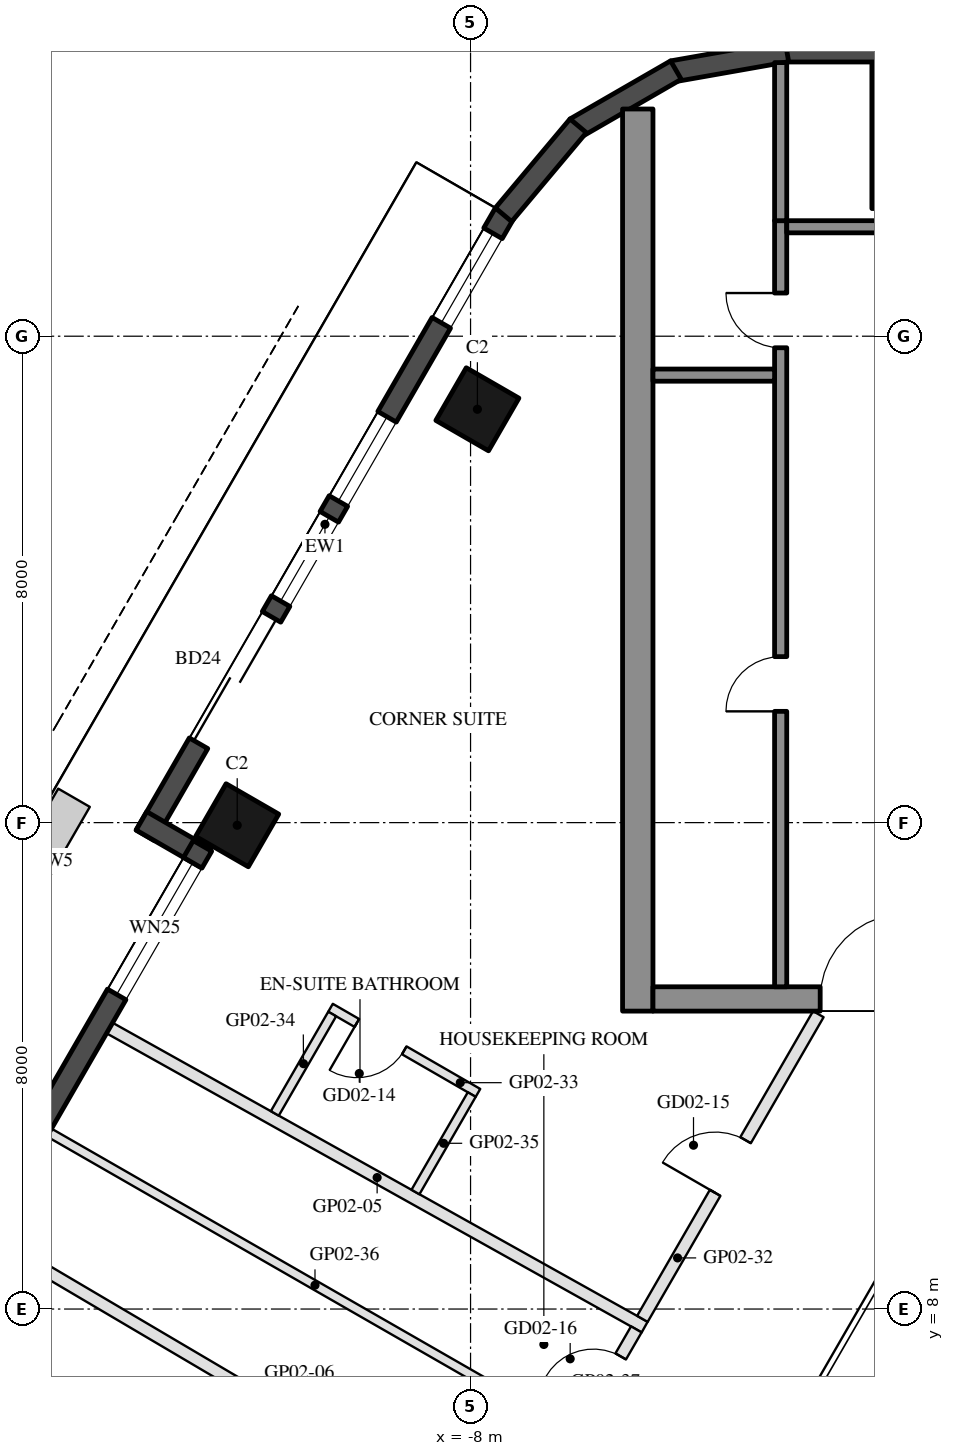
"""IFC4 building model, lengths in metres.
Left out: names, types, materials, properties, quantities, classifications, styles, units other than length and angle.
Written with IfcOpenShell. Run it as: python <this file> out.ifc"""

import sys

from ifc_helpers import new_model, si_unit, direction, frame, frame_2d, origin, origin_2d, place, context, subcontext, project, spatial, rectangle, hollow_rectangle, extrude, element, fill, save


model = new_model("IFC4")
c1 = context("Model", 3, precision=1e-05, world=origin(), true_north=direction((0.0, 1.0)))
c2 = subcontext(c1, "Body", "Model", "MODEL_VIEW")
j1 = project(units=[si_unit("LENGTHUNIT", "METRE"), si_unit("PLANEANGLEUNIT", "RADIAN")], contexts=[c1])
p1 = place(None, origin())
s1 = spatial("IfcSite", under=j1, at=p1, CompositionType="ELEMENT")
p2 = place(p1, origin())
s2 = spatial("IfcBuilding", under=s1, at=p2, CompositionType="ELEMENT")
p3 = place(p2, frame((0.0, 0.0, 57.6)))
s3 = spatial("IfcBuildingStorey", under=s2, at=p3, CompositionType="ELEMENT", Elevation=57.6)
for number, where, z_axis, x_axis in (
    (1, (-7.888, 22.798, 0.0), (0.0, 0.0, 1.0), (0.5, 0.866, 0.0)),
    (2, (-11.838, 15.957, 0.0), (0.0, 0.0, 1.0), (0.5, 0.866, 0.0)),
):
    element("IfcColumn", number, at=place(p3, frame(where, z_axis=z_axis, x_axis=x_axis)), inside=s3, PredefinedType="COLUMN", context=c2, shape_type="SweptSolid", body=[
        extrude(hollow_rectangle(XDim=1.0, YDim=1.0, WallThickness=0.045, at=origin_2d()), origin(), (0.0, 0.0, 1.0), 3.7),
    ])
p4 = place(p3, frame((0.0, 27.3, 0.0), z_axis=(0.0, 0.0, 1.0), x_axis=(1.0, 0.0, 0.0)))
e3 = element("IfcColumn", 3, at=p4, inside=s3, PredefinedType="COLUMN", context=c2, shape_type="SweptSolid", body=[
    extrude(hollow_rectangle(XDim=2.8, YDim=2.4, WallThickness=0.07, at=origin_2d()), origin(), (0.0, 0.0, 1.0), 3.7),
])
p5 = place(p3, frame((-7.441, 26.022, 0.0), z_axis=(0.0, 0.0, 1.0), x_axis=(-0.499992533062, -0.86602971478, 0.0)))
e4 = element("IfcWall", 4, at=p5, inside=s3, PredefinedType="SOLIDWALL", context=c2, shape_type="SweptSolid", body=[
    extrude(rectangle(XDim=11.816, YDim=0.35, at=frame_2d((5.908, 0.0))), origin(), (0.0, 0.0, 1.0), 3.55),
])
p6 = place(p5, frame((0.381, 0.0, 0.3)))
e5 = element("IfcOpeningElement", 5, at=p6, cuts=e4, PredefinedType="OPENING", context=c2, shape_type="SweptSolid", body=[
    extrude(rectangle(XDim=1.7, YDim=2.65, at=frame_2d((0.85, 1.325))), frame((0.0, 0.185, 0.0), z_axis=(0.0, -1.0, 0.0), x_axis=(1.0, 0.0, 0.0)), (0.0, 0.0, 1.0), 0.37),
])
p7 = place(p5, frame((7.666, 0.0, 0.0)))
e6 = element("IfcOpeningElement", 6, at=p7, cuts=e4, PredefinedType="OPENING", context=c2, shape_type="SweptSolid", body=[
    extrude(rectangle(XDim=2.4, YDim=2.4, at=frame_2d((1.2, 1.2))), frame((0.0, 0.185, 0.0), z_axis=(0.0, -1.0, 0.0), x_axis=(1.0, 0.0, 0.0)), (0.0, 0.0, 1.0), 0.37),
])
p8 = place(p5, frame((3.865, 0.0, 0.3)))
e7 = element("IfcOpeningElement", 7, at=p8, cuts=e4, PredefinedType="OPENING", context=c2, shape_type="SweptSolid", body=[
    extrude(rectangle(XDim=1.6, YDim=2.65, at=frame_2d((0.8, 1.325))), frame((0.0, 0.185, 0.0), z_axis=(0.0, -1.0, 0.0), x_axis=(1.0, 0.0, 0.0)), (0.0, 0.0, 1.0), 0.37),
])
p9 = place(p5, frame((5.765, 0.0, 0.3)))
e8 = element("IfcOpeningElement", 8, at=p9, cuts=e4, PredefinedType="OPENING", context=c2, shape_type="SweptSolid", body=[
    extrude(rectangle(XDim=1.6, YDim=2.65, at=frame_2d((0.8, 1.325))), frame((0.0, 0.185, 0.0), z_axis=(0.0, -1.0, 0.0), x_axis=(1.0, 0.0, 0.0)), (0.0, 0.0, 1.0), 0.37),
])
p10 = place(p3, frame((-13.413, 16.029, 0.0), z_axis=(0.0, 0.0, 1.0), x_axis=(0.866005645448, -0.500034220881, 0.0)))
e9 = element("IfcWall", 9, at=p10, inside=s3, PredefinedType="SOLIDWALL", context=c2, shape_type="SweptSolid", body=[
    extrude(rectangle(XDim=1.22, YDim=0.35, at=frame_2d((0.61, 0.0))), origin(), (0.0, 0.0, 1.0), 3.55),
])
p11 = place(p3, frame((-12.409, 15.617, 0.0), z_axis=(0.0, 0.0, 1.0), x_axis=(-0.500003597184, -0.866023326939, 0.0)))
e10 = element("IfcWall", 10, at=p11, inside=s3, PredefinedType="SOLIDWALL", context=c2, shape_type="SweptSolid", body=[
    extrude(rectangle(XDim=6.74, YDim=0.35, at=frame_2d((3.37, 0.0))), origin(), (0.0, 0.0, 1.0), 3.55),
])
p12 = place(p11, frame((0.32, 0.0, 0.3)))
e11 = element("IfcOpeningElement", 11, at=p12, cuts=e10, PredefinedType="OPENING", context=c2, shape_type="SweptSolid", body=[
    extrude(rectangle(XDim=2.5, YDim=2.65, at=frame_2d((1.25, 1.325))), frame((0.0, 0.185, 0.0), z_axis=(0.0, -1.0, 0.0), x_axis=(1.0, 0.0, 0.0)), (0.0, 0.0, 1.0), 0.37),
])
p13 = place(p3, frame((2.829, 28.685, 0.0), z_axis=(0.0, 0.0, 1.0), x_axis=(-1.0, 0.0, 0.0)))
e12 = element("IfcWall", 12, at=p13, inside=s3, PredefinedType="SOLIDWALL", context=c2, shape_type="SweptSolid", body=[
    extrude(rectangle(XDim=5.658, YDim=0.35, at=frame_2d((2.829, 0.0))), origin(), (0.0, 0.0, 1.0), 3.55),
])
for number, where, z_axis, x_axis in (
    (13, (-2.799, 28.688, 0.0), (0.0, 0.0, 1.0), (-0.985, -0.174, 0.0)),
    (14, (-4.623, 28.377, 0.0), (0.0, 0.0, 1.0), (-0.866, -0.5, 0.0)),
):
    element("IfcWall", number, at=place(p3, frame(where, z_axis=z_axis, x_axis=x_axis)), inside=s3, PredefinedType="SOLIDWALL", context=c2, shape_type="SweptSolid", body=[
        extrude(rectangle(XDim=1.91, YDim=0.35, at=frame_2d((0.955, 0.0))), origin(), (0.0, 0.0, 1.0), 3.55),
    ])
p14 = place(p3, frame((-6.23, 27.461, 0.0), z_axis=(0.0, 0.0, 1.0), x_axis=(-0.642808304945, -0.766027077259, 0.0)))
e15 = element("IfcWall", 15, at=p14, inside=s3, PredefinedType="SOLIDWALL", context=c2, shape_type="SweptSolid", body=[
    extrude(rectangle(XDim=1.91, YDim=0.35, at=frame_2d((0.955, 0.0))), origin(), (0.0, 0.0, 1.0), 3.55),
])
p15 = place(p3, frame((-5.25, 12.9, 0.0), z_axis=(0.0, 0.0, 1.0), x_axis=(0.0, 1.0, 0.0)))
e16 = element("IfcWall", 16, at=p15, inside=s3, PredefinedType="SHEAR", context=c2, shape_type="SweptSolid", body=[
    extrude(rectangle(XDim=14.837, YDim=0.5, at=frame_2d((7.418, 0.0))), origin(), (0.0, 0.0, 1.0), 3.5),
])
p16 = place(p3, frame((5.0, 13.1, 0.0), z_axis=(0.0, 0.0, 1.0), x_axis=(-1.0, 0.0, 0.0)))
e17 = element("IfcWall", 17, at=p16, inside=s3, PredefinedType="SHEAR", context=c2, shape_type="SweptSolid", body=[
    extrude(rectangle(XDim=10.0, YDim=0.4, at=frame_2d((5.0, 0.0))), origin(), (0.0, 0.0, 1.0), 3.5),
])
p17 = place(p16, frame((3.55, 0.0, 0.0)))
e18 = element("IfcOpeningElement", 18, at=p17, cuts=e17, PredefinedType="OPENING", context=c2, shape_type="SweptSolid", body=[
    extrude(rectangle(XDim=1.1, YDim=2.1, at=frame_2d((0.55, 1.05))), frame((0.0, 0.21, 0.0), z_axis=(0.0, -1.0, 0.0), x_axis=(1.0, 0.0, 0.0)), (0.0, 0.0, 1.0), 0.42),
])
p18 = place(p16, frame((5.85, 0.0, 0.0)))
e19 = element("IfcOpeningElement", 19, at=p18, cuts=e17, PredefinedType="OPENING", context=c2, shape_type="SweptSolid", body=[
    extrude(rectangle(XDim=1.4, YDim=2.1, at=frame_2d((0.7, 1.05))), frame((0.0, 0.21, 0.0), z_axis=(0.0, -1.0, 0.0), x_axis=(1.0, 0.0, 0.0)), (0.0, 0.0, 1.0), 0.42),
])
p19 = place(p3, frame((-2.9, 13.3, 0.0), z_axis=(0.0, 0.0, 1.0), x_axis=(0.0, 1.0, 0.0)))
e20 = element("IfcWall", 20, at=p19, inside=s3, PredefinedType="SHEAR", context=c2, shape_type="SweptSolid", body=[
    extrude(rectangle(XDim=12.6, YDim=0.2, at=frame_2d((6.3, 0.0))), origin(), (0.0, 0.0, 1.0), 3.5),
])
p20 = place(p19, frame((4.53, 0.0, 0.0)))
e21 = element("IfcOpeningElement", 21, at=p20, cuts=e20, PredefinedType="OPENING", context=c2, shape_type="SweptSolid", body=[
    extrude(rectangle(XDim=0.9, YDim=2.1, at=frame_2d((0.45, 1.05))), frame((0.0, 0.11, 0.0), z_axis=(0.0, -1.0, 0.0), x_axis=(1.0, 0.0, 0.0)), (0.0, 0.0, 1.0), 0.22),
])
p21 = place(p19, frame((10.51, 0.0, 0.0)))
e22 = element("IfcOpeningElement", 22, at=p21, cuts=e20, PredefinedType="OPENING", context=c2, shape_type="SweptSolid", body=[
    extrude(rectangle(XDim=0.9, YDim=2.1, at=frame_2d((0.45, 1.05))), frame((0.0, 0.11, 0.0), z_axis=(0.0, -1.0, 0.0), x_axis=(1.0, 0.0, 0.0)), (0.0, 0.0, 1.0), 0.22),
])
p22 = place(p3, frame((-0.4, 25.8, 0.0), z_axis=(0.0, 0.0, 1.0), x_axis=(-1.0, 0.0, 0.0)))
e23 = element("IfcWall", 23, at=p22, inside=s3, PredefinedType="SHEAR", context=c2, shape_type="SweptSolid", body=[
    extrude(rectangle(XDim=2.4, YDim=0.2, at=frame_2d((1.2, 0.0))), origin(), (0.0, 0.0, 1.0), 3.5),
])
p23 = place(p3, frame((-3.0, 23.36, 0.0), z_axis=(0.0, 0.0, 1.0), x_axis=(-1.0, 0.0, 0.0)))
e24 = element("IfcWall", 24, at=p23, inside=s3, PredefinedType="SHEAR", context=c2, shape_type="SweptSolid", body=[
    extrude(rectangle(XDim=2.0, YDim=0.2, at=frame_2d((1.0, 0.0))), origin(), (0.0, 0.0, 1.0), 3.5),
])
p24 = place(p3, frame((-2.9, 25.9, 0.0), z_axis=(0.0, 0.0, 1.0), x_axis=(0.0, 1.0, 0.0)))
e25 = element("IfcWall", 25, at=p24, inside=s3, PredefinedType="SHEAR", context=c2, shape_type="SweptSolid", body=[
    extrude(rectangle(XDim=2.6, YDim=0.2, at=frame_2d((1.3, 0.0))), origin(), (0.0, 0.0, 1.0), 3.5),
])
p25 = place(p3, frame((-13.936, 12.622, 0.0), z_axis=(0.0, 0.0, 1.0), x_axis=(0.872898889426, -0.487901146585, 0.0)))
e26 = element("IfcWall", 26, at=p25, inside=s3, PredefinedType="PARTITIONING", context=c2, shape_type="SweptSolid", body=[
    extrude(rectangle(XDim=10.081, YDim=0.2, at=frame_2d((5.041, 0.0))), origin(), (0.0, 0.0, 1.0), 2.95),
])
p26 = place(p3, frame((-15.362, 8.853, 0.0), z_axis=(0.0, 0.0, 1.0), x_axis=(0.861347313363, -0.508016540835, 0.0)))
e27 = element("IfcWall", 27, at=p26, inside=s3, PredefinedType="PARTITIONING", context=c2, shape_type="SweptSolid", body=[
    extrude(rectangle(XDim=9.43, YDim=0.2, at=frame_2d((4.715, 0.0))), origin(), (0.0, 0.0, 1.0), 2.95),
])
p27 = place(p3, frame((-5.174, 7.838, 0.0), z_axis=(0.0, 0.0, 1.0), x_axis=(0.499973220989, 0.866040864101, 0.0)))
e28 = element("IfcWall", 28, at=p27, inside=s3, PredefinedType="PARTITIONING", context=c2, shape_type="SweptSolid", body=[
    extrude(rectangle(XDim=5.787, YDim=0.2, at=frame_2d((2.894, 0.0))), origin(), (0.0, 0.0, 1.0), 2.95),
])
p28 = place(p27, frame((2.393, 0.0, 0.0)))
e29 = element("IfcOpeningElement", 29, at=p28, cuts=e28, PredefinedType="OPENING", context=c2, shape_type="SweptSolid", body=[
    extrude(rectangle(XDim=1.0, YDim=2.1, at=frame_2d((0.5, 1.05))), frame((0.0, 0.11, 0.0), z_axis=(0.0, -1.0, 0.0), x_axis=(1.0, 0.0, 0.0)), (0.0, 0.0, 1.0), 0.22),
])
p29 = place(p3, frame((-7.878, 11.555, 0.0), z_axis=(0.0, 0.0, 1.0), x_axis=(-0.865996816683, 0.500049511043, 0.0)))
e30 = element("IfcWall", 30, at=p29, inside=s3, PredefinedType="PARTITIONING", context=c2, shape_type="SweptSolid", body=[
    extrude(rectangle(XDim=2.8, YDim=0.15, at=frame_2d((1.4, 0.0))), origin(), (0.0, 0.0, 1.0), 3.55),
])
p30 = place(p29, frame((1.4, 0.0, 0.0)))
e31 = element("IfcOpeningElement", 31, at=p30, cuts=e30, PredefinedType="OPENING", context=c2, shape_type="SweptSolid", body=[
    extrude(rectangle(XDim=0.9, YDim=2.1, at=frame_2d((0.45, 1.05))), frame((0.0, 0.085, 0.0), z_axis=(0.0, -1.0, 0.0), x_axis=(1.0, 0.0, 0.0)), (0.0, 0.0, 1.0), 0.17),
])
p31 = place(p3, frame((-10.275, 12.853, 0.0), z_axis=(0.0, 0.0, 1.0), x_axis=(-0.499950073403, -0.866054227, 0.0)))
e32 = element("IfcWall", 32, at=p31, inside=s3, PredefinedType="PARTITIONING", context=c2, shape_type="SweptSolid", body=[
    extrude(rectangle(XDim=1.888, YDim=0.15, at=frame_2d((0.944, 0.0))), origin(), (0.0, 0.0, 1.0), 3.55),
])
p32 = place(p3, frame((-7.98, 11.528, 0.0), z_axis=(0.0, 0.0, 1.0), x_axis=(-0.500011685716, -0.866018656928, 0.0)))
e33 = element("IfcWall", 33, at=p32, inside=s3, PredefinedType="PARTITIONING", context=c2, shape_type="SweptSolid", body=[
    extrude(rectangle(XDim=1.851, YDim=0.15, at=frame_2d((0.926, 0.0))), origin(), (0.0, 0.0, 1.0), 3.55),
])
p33 = place(p3, frame((-14.929, 10.902, 0.0), z_axis=(0.0, 0.0, 1.0), x_axis=(0.867191892367, -0.497974117614, 0.0)))
e34 = element("IfcWall", 34, at=p33, inside=s3, PredefinedType="PARTITIONING", context=c2, shape_type="SweptSolid", body=[
    extrude(rectangle(XDim=10.08, YDim=0.15, at=frame_2d((5.04, 0.0))), origin(), (0.0, 0.0, 1.0), 2.96),
])
p34 = place(p3, frame((-6.237, 5.997, 0.0), z_axis=(0.0, 0.0, 1.0), x_axis=(0.500051616692, 0.865995600822, 0.0)))
e35 = element("IfcWall", 35, at=p34, inside=s3, PredefinedType="PARTITIONING", context=c2, shape_type="SweptSolid", body=[
    extrude(rectangle(XDim=1.926, YDim=0.2, at=frame_2d((0.963, 0.0))), origin(), (0.0, 0.0, 1.0), 2.95),
])
p35 = place(p34, frame((0.513, 0.0, 0.0)))
e36 = element("IfcOpeningElement", 36, at=p35, cuts=e35, PredefinedType="OPENING", context=c2, shape_type="SweptSolid", body=[
    extrude(rectangle(XDim=0.9, YDim=2.1, at=frame_2d((0.45, 1.05))), frame((0.0, 0.11, 0.0), z_axis=(0.0, -1.0, 0.0), x_axis=(1.0, 0.0, 0.0)), (0.0, 0.0, 1.0), 0.22),
])
p36 = place(p6, origin())
e37 = element("IfcWindow", 37, at=p36, inside=s3, PartitioningType="SINGLE_PANEL", PredefinedType="WINDOW", context=c2, shape_type="SweptSolid", body=[
    extrude(rectangle(XDim=1.7, YDim=2.65, at=frame_2d((0.85, 1.325))), frame((0.0, 0.03, 0.0), z_axis=(0.0, -1.0, 0.0), x_axis=(1.0, 0.0, 0.0)), (0.0, 0.0, 1.0), 0.06),
])
fill(e5, e37)
p37 = place(p7, frame((2.4, 0.0, 0.0), z_axis=(0.0, 0.0, 1.0), x_axis=(-1.0, 0.0, 0.0)))
e38 = element("IfcDoor", 38, at=p37, inside=s3, OperationType="SLIDING_TO_LEFT", PredefinedType="DOOR", context=c2, shape_type="SweptSolid", body=[
    extrude(rectangle(XDim=2.4, YDim=2.4, at=frame_2d((1.2, 1.2))), frame((0.0, 0.025, 0.0), z_axis=(0.0, -1.0, 0.0), x_axis=(1.0, 0.0, 0.0)), (0.0, 0.0, 1.0), 0.05),
])
fill(e6, e38)
p38 = place(p8, origin())
e39 = element("IfcWindow", 39, at=p38, inside=s3, PartitioningType="SINGLE_PANEL", PredefinedType="WINDOW", context=c2, shape_type="SweptSolid", body=[
    extrude(rectangle(XDim=1.6, YDim=2.65, at=frame_2d((0.8, 1.325))), frame((0.0, 0.03, 0.0), z_axis=(0.0, -1.0, 0.0), x_axis=(1.0, 0.0, 0.0)), (0.0, 0.0, 1.0), 0.06),
])
fill(e7, e39)
p39 = place(p9, origin())
e40 = element("IfcWindow", 40, at=p39, inside=s3, PartitioningType="SINGLE_PANEL", PredefinedType="WINDOW", context=c2, shape_type="SweptSolid", body=[
    extrude(rectangle(XDim=1.6, YDim=2.65, at=frame_2d((0.8, 1.325))), frame((0.0, 0.03, 0.0), z_axis=(0.0, -1.0, 0.0), x_axis=(1.0, 0.0, 0.0)), (0.0, 0.0, 1.0), 0.06),
])
fill(e8, e40)
p40 = place(p12, origin())
e41 = element("IfcWindow", 41, at=p40, inside=s3, PartitioningType="SINGLE_PANEL", PredefinedType="WINDOW", context=c2, shape_type="SweptSolid", body=[
    extrude(rectangle(XDim=2.5, YDim=2.65, at=frame_2d((1.25, 1.325))), frame((0.0, 0.03, 0.0), z_axis=(0.0, -1.0, 0.0), x_axis=(1.0, 0.0, 0.0)), (0.0, 0.0, 1.0), 0.06),
])
fill(e11, e41)
p41 = place(p20, origin())
e42 = element("IfcDoor", 42, at=p41, inside=s3, OperationType="SINGLE_SWING_LEFT", PredefinedType="DOOR", context=c2, shape_type="SweptSolid", body=[
    extrude(rectangle(XDim=0.9, YDim=2.1, at=frame_2d((0.45, 1.05))), frame((0.0, 0.025, 0.0), z_axis=(0.0, -1.0, 0.0), x_axis=(1.0, 0.0, 0.0)), (0.0, 0.0, 1.0), 0.05),
])
fill(e21, e42)
p42 = place(p21, origin())
e43 = element("IfcDoor", 43, at=p42, inside=s3, OperationType="SINGLE_SWING_RIGHT", PredefinedType="DOOR", context=c2, shape_type="SweptSolid", body=[
    extrude(rectangle(XDim=0.9, YDim=2.1, at=frame_2d((0.45, 1.05))), frame((0.0, 0.025, 0.0), z_axis=(0.0, -1.0, 0.0), x_axis=(1.0, 0.0, 0.0)), (0.0, 0.0, 1.0), 0.05),
])
fill(e22, e43)
p43 = place(p18, frame((1.4, 0.0, 0.0), z_axis=(0.0, 0.0, 1.0), x_axis=(-1.0, 0.0, 0.0)))
e44 = element("IfcDoor", 44, at=p43, inside=s3, OperationType="DOUBLE_DOOR_SINGLE_SWING", PredefinedType="DOOR", context=c2, shape_type="SweptSolid", body=[
    extrude(rectangle(XDim=1.4, YDim=2.1, at=frame_2d((0.7, 1.05))), frame((0.0, 0.025, 0.0), z_axis=(0.0, -1.0, 0.0), x_axis=(1.0, 0.0, 0.0)), (0.0, 0.0, 1.0), 0.05),
])
fill(e19, e44)
p44 = place(p30, origin())
e45 = element("IfcDoor", 45, at=p44, inside=s3, OperationType="SINGLE_SWING_RIGHT", PredefinedType="DOOR", context=c2, shape_type="SweptSolid", body=[
    extrude(rectangle(XDim=0.9, YDim=2.1, at=frame_2d((0.45, 1.05))), frame((0.0, 0.025, 0.0), z_axis=(0.0, -1.0, 0.0), x_axis=(1.0, 0.0, 0.0)), (0.0, 0.0, 1.0), 0.05),
])
fill(e31, e45)
p45 = place(p28, origin())
e46 = element("IfcDoor", 46, at=p45, inside=s3, OperationType="SINGLE_SWING_LEFT", PredefinedType="DOOR", context=c2, shape_type="SweptSolid", body=[
    extrude(rectangle(XDim=1.0, YDim=2.1, at=frame_2d((0.5, 1.05))), frame((0.0, 0.025, 0.0), z_axis=(0.0, -1.0, 0.0), x_axis=(1.0, 0.0, 0.0)), (0.0, 0.0, 1.0), 0.05),
])
fill(e29, e46)
p46 = place(p35, origin())
e47 = element("IfcDoor", 47, at=p46, inside=s3, OperationType="SINGLE_SWING_LEFT", PredefinedType="DOOR", context=c2, shape_type="SweptSolid", body=[
    extrude(rectangle(XDim=0.9, YDim=2.1, at=frame_2d((0.45, 1.05))), frame((0.0, 0.025, 0.0), z_axis=(0.0, -1.0, 0.0), x_axis=(1.0, 0.0, 0.0)), (0.0, 0.0, 1.0), 0.05),
])
fill(e36, e47)
save(model, sys.argv[1])
